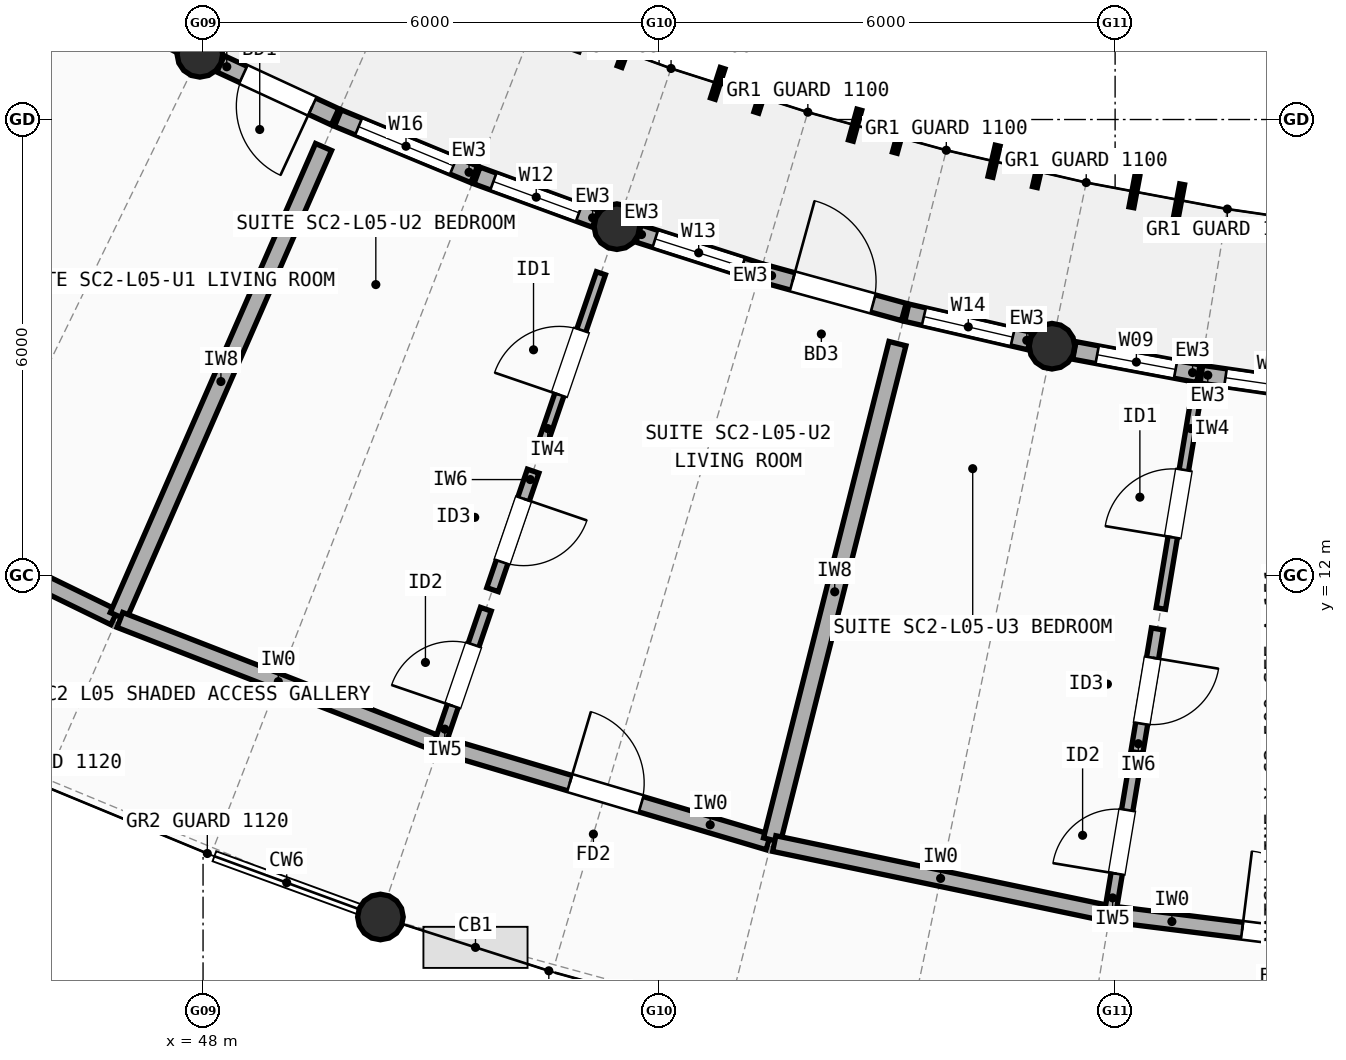
"""IFC4 building model, lengths in metres.
Left out: names, types, materials, properties, quantities, classifications, styles, units other than length and angle.
Written with IfcOpenShell. Run it as: python <this file> out.ifc"""

import sys

from ifc_helpers import new_model, si_unit, direction, frame, frame_2d, origin, origin_2d, place, context, subcontext, project, spatial, rectangle, circle, extrude, element, fill, save


model = new_model("IFC4")
c1 = context("Model", 3, precision=1e-05, world=origin(), true_north=direction((0.0, 1.0)))
c2 = subcontext(c1, "Body", "Model", "MODEL_VIEW")
j1 = project(units=[si_unit("LENGTHUNIT", "METRE"), si_unit("PLANEANGLEUNIT", "RADIAN")], contexts=[c1])
p1 = place(None, origin())
s1 = spatial("IfcSite", under=j1, at=p1, CompositionType="ELEMENT")
p2 = place(p1, origin())
s2 = spatial("IfcBuilding", under=s1, at=p2, CompositionType="ELEMENT")
p3 = place(p2, frame((0.0, 0.0, 17.3)))
s3 = spatial("IfcBuildingStorey", under=s2, at=p3, CompositionType="ELEMENT", Elevation=17.3)
for number, where, z_axis, x_axis in (
    (1, (47.958, 18.858, 0.0), (0.0, 0.0, 1.0), (1.0, 0.0, 0.0)),
    (2, (53.445, 16.59, 0.0), (0.0, 0.0, 1.0), (1.0, 0.0, 0.0)),
    (3, (50.334, 7.508, 0.0), (0.0, 0.0, 1.0), (1.0, 0.0, 0.0)),
    (4, (59.169, 15.018, 0.0), (0.0, 0.0, 1.0), (1.0, 0.0, 0.0)),
):
    element("IfcColumn", number, at=place(p3, frame(where, z_axis=z_axis, x_axis=x_axis)), inside=s3, PredefinedType="COLUMN", context=c2, shape_type="SweptSolid", body=[
        extrude(circle(Radius=0.3, at=origin_2d()), origin(), (0.0, 0.0, 1.0), 2.94),
    ])
p4 = place(p3, frame((48.23, 18.732, 0.0), z_axis=(0.0, 0.0, 1.0), x_axis=(0.907631944022, -0.419766904592, 0.0)))
e5 = element("IfcWall", 5, at=p4, inside=s3, PredefinedType="STANDARD", context=c2, shape_type="SweptSolid", body=[
    extrude(rectangle(XDim=1.66, YDim=0.235, at=frame_2d((0.83, 0.0))), origin(), (0.0, 0.0, 1.0), 2.676),
])
p5 = place(p4, frame((0.33, 0.0, 0.0)))
e6 = element("IfcOpeningElement", 6, at=p5, cuts=e5, PredefinedType="OPENING", context=c2, shape_type="SweptSolid", body=[
    extrude(rectangle(XDim=1.0, YDim=2.15, at=frame_2d((0.5, 1.075))), frame((0.0, 0.127, 0.0), z_axis=(0.0, -1.0, 0.0), x_axis=(1.0, 0.0, 0.0)), (0.0, 0.0, 1.0), 0.255),
])
p6 = place(p3, frame((49.774, 18.019, 0.0), z_axis=(0.0, 0.0, 1.0), x_axis=(0.92414555515, -0.382040564465, 0.0)))
e7 = element("IfcWall", 7, at=p6, inside=s3, PredefinedType="STANDARD", context=c2, shape_type="SweptSolid", body=[
    extrude(rectangle(XDim=1.94, YDim=0.235, at=frame_2d((0.97, 0.0))), origin(), (0.0, 0.0, 1.0), 2.676),
])
p7 = place(p6, frame((0.295, 0.0, 0.85)))
e8 = element("IfcOpeningElement", 8, at=p7, cuts=e7, PredefinedType="OPENING", context=c2, shape_type="SweptSolid", body=[
    extrude(rectangle(XDim=1.35, YDim=1.5, at=frame_2d((0.675, 0.75))), frame((0.0, 0.127, 0.0), z_axis=(0.0, -1.0, 0.0), x_axis=(1.0, 0.0, 0.0)), (0.0, 0.0, 1.0), 0.255),
])
p8 = place(p3, frame((51.604, 17.264, 0.0), z_axis=(0.0, 0.0, 1.0), x_axis=(0.939139054149, -0.343537242482, 0.0)))
e9 = element("IfcWall", 9, at=p8, inside=s3, PredefinedType="STANDARD", context=c2, shape_type="SweptSolid", body=[
    extrude(rectangle(XDim=1.66, YDim=0.235, at=frame_2d((0.83, 0.0))), origin(), (0.0, 0.0, 1.0), 2.676),
])
p9 = place(p8, frame((0.23, 0.0, 0.85)))
e10 = element("IfcOpeningElement", 10, at=p9, cuts=e9, PredefinedType="OPENING", context=c2, shape_type="SweptSolid", body=[
    extrude(rectangle(XDim=1.2, YDim=1.35, at=frame_2d((0.6, 0.675))), frame((0.0, 0.127, 0.0), z_axis=(0.0, -1.0, 0.0), x_axis=(1.0, 0.0, 0.0)), (0.0, 0.0, 1.0), 0.255),
])
p10 = place(p3, frame((53.731, 16.499, 0.0), z_axis=(0.0, 0.0, 1.0), x_axis=(0.952523149859, -0.304466170508, 0.0)))
e11 = element("IfcWall", 11, at=p10, inside=s3, PredefinedType="STANDARD", context=c2, shape_type="SweptSolid", body=[
    extrude(rectangle(XDim=1.66, YDim=0.235, at=frame_2d((0.83, 0.0))), origin(), (0.0, 0.0, 1.0), 2.676),
])
p11 = place(p10, frame((0.23, 0.0, 0.85)))
e12 = element("IfcOpeningElement", 12, at=p11, cuts=e11, PredefinedType="OPENING", context=c2, shape_type="SweptSolid", body=[
    extrude(rectangle(XDim=1.2, YDim=1.45, at=frame_2d((0.6, 0.725))), frame((0.0, 0.127, 0.0), z_axis=(0.0, -1.0, 0.0), x_axis=(1.0, 0.0, 0.0)), (0.0, 0.0, 1.0), 0.255),
])
p12 = place(p3, frame((55.35, 15.982, 0.0), z_axis=(0.0, 0.0, 1.0), x_axis=(0.964271323293, -0.264916619098, 0.0)))
e13 = element("IfcWall", 13, at=p12, inside=s3, PredefinedType="STANDARD", context=c2, shape_type="SweptSolid", body=[
    extrude(rectangle(XDim=1.94, YDim=0.235, at=frame_2d((0.97, 0.0))), origin(), (0.0, 0.0, 1.0), 2.676),
])
p13 = place(p12, frame((0.42, 0.0, 0.0)))
e14 = element("IfcOpeningElement", 14, at=p13, cuts=e13, PredefinedType="OPENING", context=c2, shape_type="SweptSolid", body=[
    extrude(rectangle(XDim=1.1, YDim=2.15, at=frame_2d((0.55, 1.075))), frame((0.0, 0.127, 0.0), z_axis=(0.0, -1.0, 0.0), x_axis=(1.0, 0.0, 0.0)), (0.0, 0.0, 1.0), 0.255),
])
p14 = place(p3, frame((57.26, 15.458, 0.0), z_axis=(0.0, 0.0, 1.0), x_axis=(0.974354001174, -0.225020622158, 0.0)))
e15 = element("IfcWall", 15, at=p14, inside=s3, PredefinedType="STANDARD", context=c2, shape_type="SweptSolid", body=[
    extrude(rectangle(XDim=1.66, YDim=0.235, at=frame_2d((0.83, 0.0))), origin(), (0.0, 0.0, 1.0), 2.676),
])
p15 = place(p14, frame((0.23, 0.0, 0.85)))
e16 = element("IfcOpeningElement", 16, at=p15, cuts=e15, PredefinedType="OPENING", context=c2, shape_type="SweptSolid", body=[
    extrude(rectangle(XDim=1.2, YDim=1.5, at=frame_2d((0.6, 0.75))), frame((0.0, 0.127, 0.0), z_axis=(0.0, -1.0, 0.0), x_axis=(1.0, 0.0, 0.0)), (0.0, 0.0, 1.0), 0.255),
])
p16 = place(p3, frame((59.464, 14.962, 0.0), z_axis=(0.0, 0.0, 1.0), x_axis=(0.982820537681, -0.184563784945, 0.0)))
e17 = element("IfcWall", 17, at=p16, inside=s3, PredefinedType="STANDARD", context=c2, shape_type="SweptSolid", body=[
    extrude(rectangle(XDim=1.66, YDim=0.235, at=frame_2d((0.83, 0.0))), origin(), (0.0, 0.0, 1.0), 2.676),
])
p17 = place(p16, frame((0.305, 0.0, 0.85)))
e18 = element("IfcOpeningElement", 18, at=p17, cuts=e17, PredefinedType="OPENING", context=c2, shape_type="SweptSolid", body=[
    extrude(rectangle(XDim=1.05, YDim=1.35, at=frame_2d((0.525, 0.675))), frame((0.0, 0.127, 0.0), z_axis=(0.0, -1.0, 0.0), x_axis=(1.0, 0.0, 0.0)), (0.0, 0.0, 1.0), 0.255),
])
p18 = place(p3, frame((61.135, 14.649, 0.0), z_axis=(0.0, 0.0, 1.0), x_axis=(0.989601751146, -0.14383453733, 0.0)))
e19 = element("IfcWall", 19, at=p18, inside=s3, PredefinedType="STANDARD", context=c2, shape_type="SweptSolid", body=[
    extrude(rectangle(XDim=1.94, YDim=0.235, at=frame_2d((0.97, 0.0))), origin(), (0.0, 0.0, 1.0), 2.676),
])
p19 = place(p18, frame((0.32, 0.0, 0.85)))
e20 = element("IfcOpeningElement", 20, at=p19, cuts=e19, PredefinedType="OPENING", context=c2, shape_type="SweptSolid", body=[
    extrude(rectangle(XDim=1.3, YDim=1.45, at=frame_2d((0.65, 0.725))), frame((0.0, 0.127, 0.0), z_axis=(0.0, -1.0, 0.0), x_axis=(1.0, 0.0, 0.0)), (0.0, 0.0, 1.0), 0.255),
])
p20 = place(p3, frame((42.812, 13.409, 0.0), z_axis=(0.0, 0.0, 1.0), x_axis=(0.898794149603, -0.438370934985, 0.0)))
e21 = element("IfcWall", 21, at=p20, inside=s3, PredefinedType="SOLIDWALL", context=c2, shape_type="SweptSolid", body=[
    extrude(rectangle(XDim=4.473, YDim=0.21, at=frame_2d((2.236, 0.0))), origin(), (0.0, 0.0, 1.0), 2.734),
])
p21 = place(p20, frame((1.737, 0.0, 0.0)))
e22 = element("IfcOpeningElement", 22, at=p21, cuts=e21, PredefinedType="OPENING", context=c2, shape_type="SweptSolid", body=[
    extrude(rectangle(XDim=1.0, YDim=2.15, at=frame_2d((0.5, 1.075))), frame((0.0, 0.115, 0.0), z_axis=(0.0, -1.0, 0.0), x_axis=(1.0, 0.0, 0.0)), (0.0, 0.0, 1.0), 0.23),
])
p22 = place(p3, frame((46.041, 19.474, 0.0), z_axis=(0.0, 0.0, 1.0), x_axis=(-0.475103009949, -0.879930184695, 0.0)))
e23 = element("IfcWall", 23, at=p22, inside=s3, PredefinedType="PARTITIONING", context=c2, shape_type="SweptSolid", body=[
    extrude(rectangle(XDim=2.8, YDim=0.125, at=frame_2d((1.4, 0.0))), origin(), (0.0, 0.0, 1.0), 2.714),
])
p23 = place(p22, frame((0.95, 0.0, 0.0)))
e24 = element("IfcOpeningElement", 24, at=p23, cuts=e23, PredefinedType="OPENING", context=c2, shape_type="SweptSolid", body=[
    extrude(rectangle(XDim=0.9, YDim=2.1, at=frame_2d((0.45, 1.05))), frame((0.0, 0.073, 0.0), z_axis=(0.0, -1.0, 0.0), x_axis=(1.0, 0.0, 0.0)), (0.0, 0.0, 1.0), 0.145),
])
p24 = place(p3, frame((49.585, 17.638, 0.0), z_axis=(0.0, 0.0, 1.0), x_axis=(-0.400932910895, -0.916107417807, 0.0)))
e25 = element("IfcWall", 25, at=p24, inside=s3, PredefinedType="SOLIDWALL", context=c2, shape_type="SweptSolid", body=[
    extrude(rectangle(XDim=6.736, YDim=0.23, at=frame_2d((3.368, 0.0))), origin(), (0.0, 0.0, 1.0), 2.754),
])
p25 = place(p3, frame((46.906, 11.417, 0.0), z_axis=(0.0, 0.0, 1.0), x_axis=(0.931847867525, -0.362849213571, 0.0)))
e26 = element("IfcWall", 26, at=p25, inside=s3, PredefinedType="SOLIDWALL", context=c2, shape_type="SweptSolid", body=[
    extrude(rectangle(XDim=4.473, YDim=0.21, at=frame_2d((2.237, 0.0))), origin(), (0.0, 0.0, 1.0), 2.714),
])
p26 = place(p3, frame((51.15, 9.768, 0.0), z_axis=(0.0, 0.0, 1.0), x_axis=(0.958602413557, -0.28474798107, 0.0)))
e27 = element("IfcWall", 27, at=p26, inside=s3, PredefinedType="SOLIDWALL", context=c2, shape_type="SweptSolid", body=[
    extrude(rectangle(XDim=4.473, YDim=0.21, at=frame_2d((2.236, 0.0))), origin(), (0.0, 0.0, 1.0), 2.754),
])
p27 = place(p26, frame((1.747, 0.0, 0.0)))
e28 = element("IfcOpeningElement", 28, at=p27, cuts=e27, PredefinedType="OPENING", context=c2, shape_type="SweptSolid", body=[
    extrude(rectangle(XDim=0.98, YDim=2.15, at=frame_2d((0.49, 1.075))), frame((0.0, 0.115, 0.0), z_axis=(0.0, -1.0, 0.0), x_axis=(1.0, 0.0, 0.0)), (0.0, 0.0, 1.0), 0.23),
])
p28 = place(p3, frame((53.235, 15.977, 0.0), z_axis=(0.0, 0.0, 1.0), x_axis=(-0.324072633759, -0.946032202437, 0.0)))
e29 = element("IfcWall", 29, at=p28, inside=s3, PredefinedType="PARTITIONING", context=c2, shape_type="SweptSolid", body=[
    extrude(rectangle(XDim=2.48, YDim=0.125, at=frame_2d((1.24, 0.0))), origin(), (0.0, 0.0, 1.0), 2.734),
])
p29 = place(p28, frame((0.79, 0.0, 0.0)))
e30 = element("IfcOpeningElement", 30, at=p29, cuts=e29, PredefinedType="OPENING", context=c2, shape_type="SweptSolid", body=[
    extrude(rectangle(XDim=0.9, YDim=2.1, at=frame_2d((0.45, 1.05))), frame((0.0, 0.073, 0.0), z_axis=(0.0, -1.0, 0.0), x_axis=(1.0, 0.0, 0.0)), (0.0, 0.0, 1.0), 0.145),
])
p30 = place(p3, frame((52.343, 13.374, 0.0), z_axis=(0.0, 0.0, 1.0), x_axis=(-0.324127376206, -0.946013448104, 0.0)))
e31 = element("IfcWall", 31, at=p30, inside=s3, PredefinedType="PLUMBINGWALL", context=c2, shape_type="SweptSolid", body=[
    extrude(rectangle(XDim=1.648, YDim=0.16, at=frame_2d((0.824, 0.0))), origin(), (0.0, 0.0, 1.0), 2.734),
])
p31 = place(p30, frame((0.384, 0.0, 0.0)))
e32 = element("IfcOpeningElement", 32, at=p31, cuts=e31, PredefinedType="OPENING", context=c2, shape_type="SweptSolid", body=[
    extrude(rectangle(XDim=0.88, YDim=2.1, at=frame_2d((0.44, 1.05))), frame((0.0, 0.09, 0.0), z_axis=(0.0, -1.0, 0.0), x_axis=(1.0, 0.0, 0.0)), (0.0, 0.0, 1.0), 0.18),
])
p32 = place(p3, frame((51.721, 11.558, 0.0), z_axis=(0.0, 0.0, 1.0), x_axis=(-0.323978335312, -0.946064500046, 0.0)))
e33 = element("IfcWall", 33, at=p32, inside=s3, PredefinedType="PARTITIONING", context=c2, shape_type="SweptSolid", body=[
    extrude(rectangle(XDim=1.84, YDim=0.15, at=frame_2d((0.92, 0.0))), origin(), (0.0, 0.0, 1.0), 2.734),
])
p33 = place(p32, frame((0.495, 0.0, 0.0)))
e34 = element("IfcOpeningElement", 34, at=p33, cuts=e33, PredefinedType="OPENING", context=c2, shape_type="SweptSolid", body=[
    extrude(rectangle(XDim=0.85, YDim=2.1, at=frame_2d((0.425, 1.05))), frame((0.0, 0.085, 0.0), z_axis=(0.0, -1.0, 0.0), x_axis=(1.0, 0.0, 0.0)), (0.0, 0.0, 1.0), 0.17),
])
p34 = place(p3, frame((57.136, 15.052, 0.0), z_axis=(0.0, 0.0, 1.0), x_axis=(-0.244982481903, -0.969527505314, 0.0)))
e35 = element("IfcWall", 35, at=p34, inside=s3, PredefinedType="SOLIDWALL", context=c2, shape_type="SweptSolid", body=[
    extrude(rectangle(XDim=6.736, YDim=0.23, at=frame_2d((3.368, 0.0))), origin(), (0.0, 0.0, 1.0), 2.714),
])
p35 = place(p3, frame((55.515, 8.474, 0.0), z_axis=(0.0, 0.0, 1.0), x_axis=(0.978806148413, -0.204788973894, 0.0)))
e36 = element("IfcWall", 36, at=p35, inside=s3, PredefinedType="SOLIDWALL", context=c2, shape_type="SweptSolid", body=[
    extrude(rectangle(XDim=4.473, YDim=0.21, at=frame_2d((2.236, 0.0))), origin(), (0.0, 0.0, 1.0), 2.734),
])
p36 = place(p3, frame((59.972, 7.545, 0.0), z_axis=(0.0, 0.0, 1.0), x_axis=(0.992349920368, -0.123457019023, 0.0)))
e37 = element("IfcWall", 37, at=p36, inside=s3, PredefinedType="SOLIDWALL", context=c2, shape_type="SweptSolid", body=[
    extrude(rectangle(XDim=4.473, YDim=0.21, at=frame_2d((2.237, 0.0))), origin(), (0.0, 0.0, 1.0), 2.714),
])
p37 = place(p36, frame((1.712, 0.0, 0.0)))
e38 = element("IfcOpeningElement", 38, at=p37, cuts=e37, PredefinedType="OPENING", context=c2, shape_type="SweptSolid", body=[
    extrude(rectangle(XDim=1.05, YDim=2.15, at=frame_2d((0.525, 1.075))), frame((0.0, 0.115, 0.0), z_axis=(0.0, -1.0, 0.0), x_axis=(1.0, 0.0, 0.0)), (0.0, 0.0, 1.0), 0.23),
])
p38 = place(p3, frame((61.061, 14.328, 0.0), z_axis=(0.0, 0.0, 1.0), x_axis=(-0.164186889233, -0.986429250075, 0.0)))
e39 = element("IfcWall", 39, at=p38, inside=s3, PredefinedType="PARTITIONING", context=c2, shape_type="SweptSolid", body=[
    extrude(rectangle(XDim=2.8, YDim=0.125, at=frame_2d((1.4, 0.0))), origin(), (0.0, 0.0, 1.0), 2.754),
])
p39 = place(p38, frame((0.95, 0.0, 0.0)))
e40 = element("IfcOpeningElement", 40, at=p39, cuts=e39, PredefinedType="OPENING", context=c2, shape_type="SweptSolid", body=[
    extrude(rectangle(XDim=0.9, YDim=2.1, at=frame_2d((0.45, 1.05))), frame((0.0, 0.073, 0.0), z_axis=(0.0, -1.0, 0.0), x_axis=(1.0, 0.0, 0.0)), (0.0, 0.0, 1.0), 0.145),
])
p40 = place(p3, frame((60.557, 11.298, 0.0), z_axis=(0.0, 0.0, 1.0), x_axis=(-0.164158726706, -0.986433937193, 0.0)))
e41 = element("IfcWall", 41, at=p40, inside=s3, PredefinedType="PLUMBINGWALL", context=c2, shape_type="SweptSolid", body=[
    extrude(rectangle(XDim=1.648, YDim=0.16, at=frame_2d((0.824, 0.0))), origin(), (0.0, 0.0, 1.0), 2.754),
])
p41 = place(p40, frame((0.384, 0.0, 0.0)))
e42 = element("IfcOpeningElement", 42, at=p41, cuts=e41, PredefinedType="OPENING", context=c2, shape_type="SweptSolid", body=[
    extrude(rectangle(XDim=0.88, YDim=2.1, at=frame_2d((0.44, 1.05))), frame((0.0, 0.09, 0.0), z_axis=(0.0, -1.0, 0.0), x_axis=(1.0, 0.0, 0.0)), (0.0, 0.0, 1.0), 0.18),
])
p42 = place(p3, frame((60.241, 9.404, 0.0), z_axis=(0.0, 0.0, 1.0), x_axis=(-0.16414076901, -0.986436925479, 0.0)))
e43 = element("IfcWall", 43, at=p42, inside=s3, PredefinedType="PARTITIONING", context=c2, shape_type="SweptSolid", body=[
    extrude(rectangle(XDim=1.84, YDim=0.15, at=frame_2d((0.92, 0.0))), origin(), (0.0, 0.0, 1.0), 2.754),
])
p43 = place(p42, frame((0.495, 0.0, 0.0)))
e44 = element("IfcOpeningElement", 44, at=p43, cuts=e43, PredefinedType="OPENING", context=c2, shape_type="SweptSolid", body=[
    extrude(rectangle(XDim=0.85, YDim=2.1, at=frame_2d((0.425, 1.05))), frame((0.0, 0.085, 0.0), z_axis=(0.0, -1.0, 0.0), x_axis=(1.0, 0.0, 0.0)), (0.0, 0.0, 1.0), 0.17),
])
p44 = place(p5, origin())
e45 = element("IfcDoor", 45, at=p44, inside=s3, OperationType="SINGLE_SWING_RIGHT", PredefinedType="DOOR", context=c2, shape_type="SweptSolid", body=[
    extrude(rectangle(XDim=1.0, YDim=2.15, at=frame_2d((0.5, 1.075))), frame((0.0, 0.025, 0.0), z_axis=(0.0, -1.0, 0.0), x_axis=(1.0, 0.0, 0.0)), (0.0, 0.0, 1.0), 0.05),
])
fill(e6, e45)
p45 = place(p7, origin())
e46 = element("IfcWindow", 46, at=p45, inside=s3, PartitioningType="SINGLE_PANEL", PredefinedType="WINDOW", context=c2, shape_type="SweptSolid", body=[
    extrude(rectangle(XDim=1.35, YDim=1.5, at=frame_2d((0.675, 0.75))), frame((0.0, 0.03, 0.0), z_axis=(0.0, -1.0, 0.0), x_axis=(1.0, 0.0, 0.0)), (0.0, 0.0, 1.0), 0.06),
])
fill(e8, e46)
p46 = place(p9, origin())
e47 = element("IfcWindow", 47, at=p46, inside=s3, PartitioningType="SINGLE_PANEL", PredefinedType="WINDOW", context=c2, shape_type="SweptSolid", body=[
    extrude(rectangle(XDim=1.2, YDim=1.35, at=frame_2d((0.6, 0.675))), frame((0.0, 0.03, 0.0), z_axis=(0.0, -1.0, 0.0), x_axis=(1.0, 0.0, 0.0)), (0.0, 0.0, 1.0), 0.06),
])
fill(e10, e47)
p47 = place(p11, origin())
e48 = element("IfcWindow", 48, at=p47, inside=s3, PartitioningType="SINGLE_PANEL", PredefinedType="WINDOW", context=c2, shape_type="SweptSolid", body=[
    extrude(rectangle(XDim=1.2, YDim=1.45, at=frame_2d((0.6, 0.725))), frame((0.0, 0.03, 0.0), z_axis=(0.0, -1.0, 0.0), x_axis=(1.0, 0.0, 0.0)), (0.0, 0.0, 1.0), 0.06),
])
fill(e12, e48)
p48 = place(p13, origin())
e49 = element("IfcDoor", 49, at=p48, inside=s3, OperationType="SINGLE_SWING_LEFT", PredefinedType="DOOR", context=c2, shape_type="SweptSolid", body=[
    extrude(rectangle(XDim=1.1, YDim=2.15, at=frame_2d((0.55, 1.075))), frame((0.0, 0.025, 0.0), z_axis=(0.0, -1.0, 0.0), x_axis=(1.0, 0.0, 0.0)), (0.0, 0.0, 1.0), 0.05),
])
fill(e14, e49)
p49 = place(p15, origin())
e50 = element("IfcWindow", 50, at=p49, inside=s3, PartitioningType="SINGLE_PANEL", PredefinedType="WINDOW", context=c2, shape_type="SweptSolid", body=[
    extrude(rectangle(XDim=1.2, YDim=1.5, at=frame_2d((0.6, 0.75))), frame((0.0, 0.03, 0.0), z_axis=(0.0, -1.0, 0.0), x_axis=(1.0, 0.0, 0.0)), (0.0, 0.0, 1.0), 0.06),
])
fill(e16, e50)
p50 = place(p17, origin())
e51 = element("IfcWindow", 51, at=p50, inside=s3, PartitioningType="SINGLE_PANEL", PredefinedType="WINDOW", context=c2, shape_type="SweptSolid", body=[
    extrude(rectangle(XDim=1.05, YDim=1.35, at=frame_2d((0.525, 0.675))), frame((0.0, 0.03, 0.0), z_axis=(0.0, -1.0, 0.0), x_axis=(1.0, 0.0, 0.0)), (0.0, 0.0, 1.0), 0.06),
])
fill(e18, e51)
p51 = place(p19, origin())
e52 = element("IfcWindow", 52, at=p51, inside=s3, PartitioningType="SINGLE_PANEL", PredefinedType="WINDOW", context=c2, shape_type="SweptSolid", body=[
    extrude(rectangle(XDim=1.3, YDim=1.45, at=frame_2d((0.65, 0.725))), frame((0.0, 0.03, 0.0), z_axis=(0.0, -1.0, 0.0), x_axis=(1.0, 0.0, 0.0)), (0.0, 0.0, 1.0), 0.06),
])
fill(e20, e52)
p52 = place(p27, origin())
e53 = element("IfcDoor", 53, at=p52, inside=s3, OperationType="SINGLE_SWING_LEFT", PredefinedType="DOOR", context=c2, shape_type="SweptSolid", body=[
    extrude(rectangle(XDim=0.98, YDim=2.15, at=frame_2d((0.49, 1.075))), frame((0.0, 0.025, 0.0), z_axis=(0.0, -1.0, 0.0), x_axis=(1.0, 0.0, 0.0)), (0.0, 0.0, 1.0), 0.05),
])
fill(e28, e53)
p53 = place(p29, origin())
e54 = element("IfcDoor", 54, at=p53, inside=s3, OperationType="SINGLE_SWING_RIGHT", PredefinedType="DOOR", context=c2, shape_type="SweptSolid", body=[
    extrude(rectangle(XDim=0.9, YDim=2.1, at=frame_2d((0.45, 1.05))), frame((0.0, 0.025, 0.0), z_axis=(0.0, -1.0, 0.0), x_axis=(1.0, 0.0, 0.0)), (0.0, 0.0, 1.0), 0.05),
])
fill(e30, e54)
p54 = place(p31, origin())
e55 = element("IfcDoor", 55, at=p54, inside=s3, OperationType="SINGLE_SWING_LEFT", PredefinedType="DOOR", context=c2, shape_type="SweptSolid", body=[
    extrude(rectangle(XDim=0.88, YDim=2.1, at=frame_2d((0.44, 1.05))), frame((0.0, 0.025, 0.0), z_axis=(0.0, -1.0, 0.0), x_axis=(1.0, 0.0, 0.0)), (0.0, 0.0, 1.0), 0.05),
])
fill(e32, e55)
p55 = place(p33, origin())
e56 = element("IfcDoor", 56, at=p55, inside=s3, OperationType="SINGLE_SWING_RIGHT", PredefinedType="DOOR", context=c2, shape_type="SweptSolid", body=[
    extrude(rectangle(XDim=0.85, YDim=2.1, at=frame_2d((0.425, 1.05))), frame((0.0, 0.025, 0.0), z_axis=(0.0, -1.0, 0.0), x_axis=(1.0, 0.0, 0.0)), (0.0, 0.0, 1.0), 0.05),
])
fill(e34, e56)
p56 = place(p37, origin())
e57 = element("IfcDoor", 57, at=p56, inside=s3, OperationType="SINGLE_SWING_LEFT", PredefinedType="DOOR", context=c2, shape_type="SweptSolid", body=[
    extrude(rectangle(XDim=1.05, YDim=2.15, at=frame_2d((0.525, 1.075))), frame((0.0, 0.025, 0.0), z_axis=(0.0, -1.0, 0.0), x_axis=(1.0, 0.0, 0.0)), (0.0, 0.0, 1.0), 0.05),
])
fill(e38, e57)
p57 = place(p39, origin())
e58 = element("IfcDoor", 58, at=p57, inside=s3, OperationType="SINGLE_SWING_RIGHT", PredefinedType="DOOR", context=c2, shape_type="SweptSolid", body=[
    extrude(rectangle(XDim=0.9, YDim=2.1, at=frame_2d((0.45, 1.05))), frame((0.0, 0.025, 0.0), z_axis=(0.0, -1.0, 0.0), x_axis=(1.0, 0.0, 0.0)), (0.0, 0.0, 1.0), 0.05),
])
fill(e40, e58)
p58 = place(p41, origin())
e59 = element("IfcDoor", 59, at=p58, inside=s3, OperationType="SINGLE_SWING_LEFT", PredefinedType="DOOR", context=c2, shape_type="SweptSolid", body=[
    extrude(rectangle(XDim=0.88, YDim=2.1, at=frame_2d((0.44, 1.05))), frame((0.0, 0.025, 0.0), z_axis=(0.0, -1.0, 0.0), x_axis=(1.0, 0.0, 0.0)), (0.0, 0.0, 1.0), 0.05),
])
fill(e42, e59)
p59 = place(p43, origin())
e60 = element("IfcDoor", 60, at=p59, inside=s3, OperationType="SINGLE_SWING_RIGHT", PredefinedType="DOOR", context=c2, shape_type="SweptSolid", body=[
    extrude(rectangle(XDim=0.85, YDim=2.1, at=frame_2d((0.425, 1.05))), frame((0.0, 0.025, 0.0), z_axis=(0.0, -1.0, 0.0), x_axis=(1.0, 0.0, 0.0)), (0.0, 0.0, 1.0), 0.05),
])
fill(e44, e60)
save(model, sys.argv[1])
